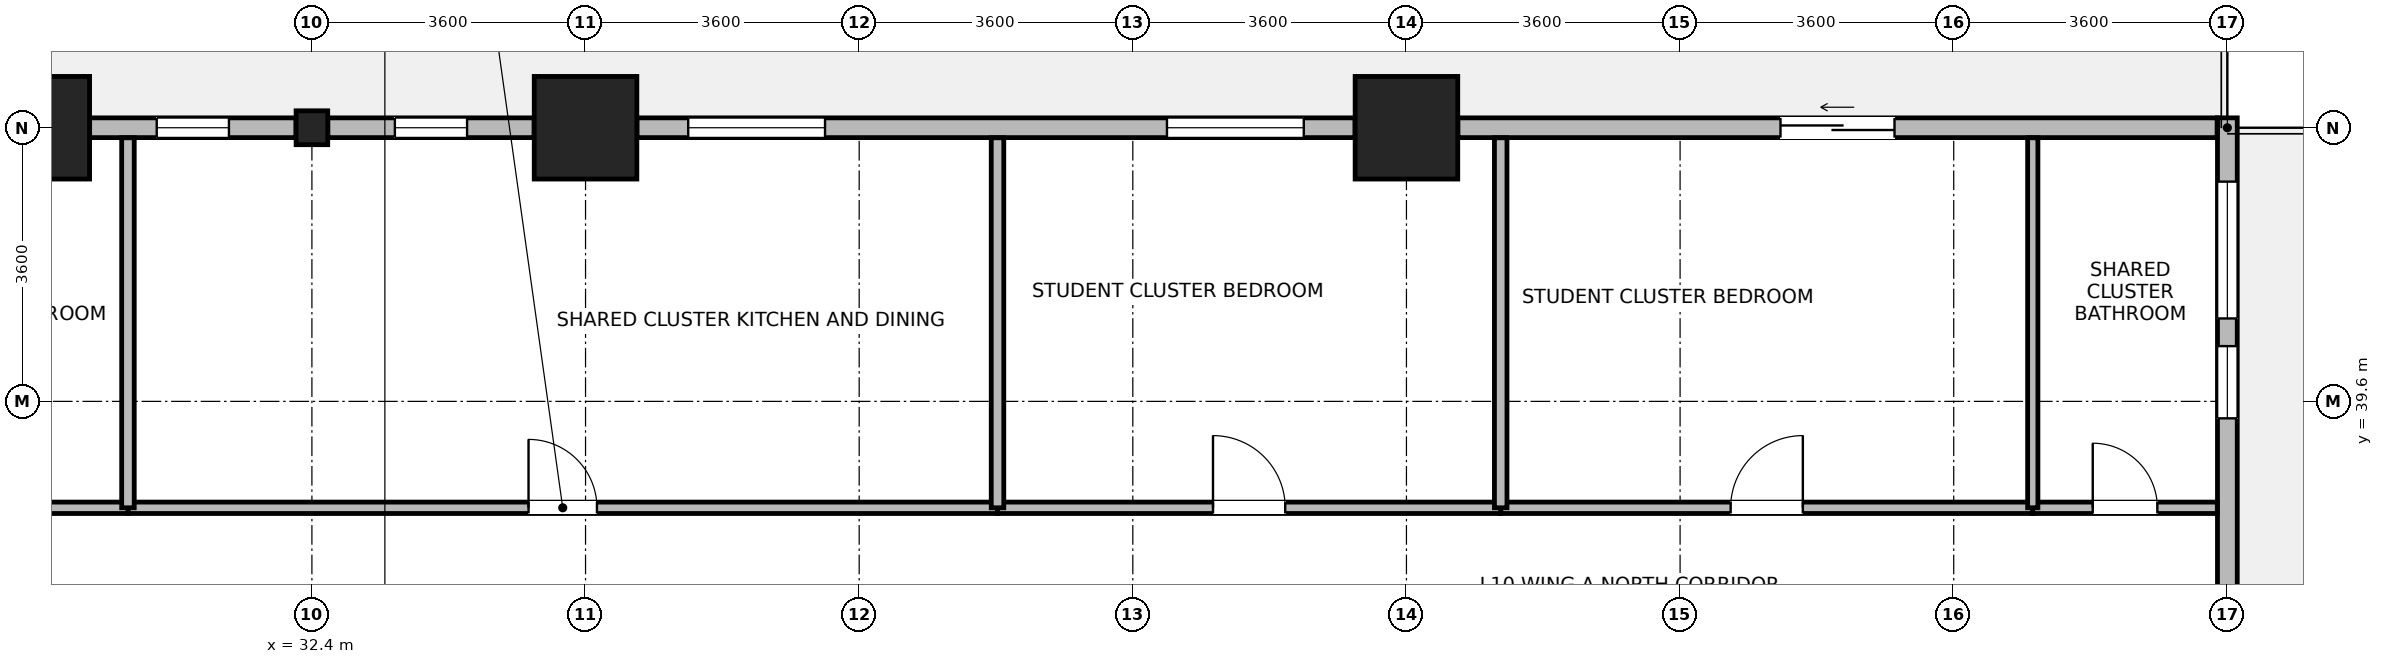
"""IFC4 building model, lengths in metres.
Left out: names, types, materials, properties, quantities, classifications, styles, units other than length and angle.
Written with IfcOpenShell. Run it as: python <this file> out.ifc"""

import sys

from ifc_helpers import new_model, si_unit, direction, frame, frame_2d, origin, origin_2d, place, context, subcontext, project, spatial, rectangle, i_section, extrude, source, transform, mapped, element, fill, save


model = new_model("IFC4")
c1 = context("Model", 3, precision=1e-05, world=origin(), true_north=direction((0.0, 1.0)))
c2 = subcontext(c1, "Body", "Model", "MODEL_VIEW")
j1 = project(units=[si_unit("LENGTHUNIT", "METRE"), si_unit("PLANEANGLEUNIT", "RADIAN")], contexts=[c1])
p1 = place(None, origin())
s1 = spatial("IfcSite", under=j1, at=p1, CompositionType="ELEMENT")
p2 = place(p1, origin())
s2 = spatial("IfcBuilding", under=s1, at=p2, CompositionType="ELEMENT")
p3 = place(p2, frame((0.0, 0.0, 43.8)))
s3 = spatial("IfcBuildingStorey", under=s2, at=p3, CompositionType="ELEMENT", Elevation=43.8)
m1 = source(origin(), c2, "Body", "SweptSolid", [
    extrude(rectangle(XDim=1.35, YDim=1.35, at=origin_2d()), origin(), (0.0, 0.0, 1.0), 3.7),
])
for number, where, z_axis, x_axis in (
    (1, (28.8, 43.2, 0.0), (0.0, 0.0, 1.0), (1.0, 0.0, 0.0)),
    (2, (36.0, 43.2, 0.0), (0.0, 0.0, 1.0), (1.0, 0.0, 0.0)),
    (3, (46.8, 43.2, 0.0), (0.0, 0.0, 1.0), (1.0, 0.0, 0.0)),
):
    element("IfcColumn", number, at=place(p3, frame(where, z_axis=z_axis, x_axis=x_axis)), inside=s3, PredefinedType="COLUMN", context=c2, shape_type="MappedRepresentation", body=[
        mapped(m1, transform((0.0, 0.0, 0.0), x_axis=(1.0, 0.0, 0.0), y_axis=(0.0, 1.0, 0.0), z_axis=(0.0, 0.0, 1.0), scale=1.0)),
    ])
m2 = source(origin(), c2, "Body", "SweptSolid", [
    extrude(i_section(OverallWidth=0.416, OverallDepth=0.446, WebThickness=0.029, FlangeThickness=0.04, FilletRadius=0.015, at=origin_2d()), origin(), (0.0, 0.0, 1.0), 3.7),
])
p4 = place(p3, frame((32.4, 43.2, 0.0), z_axis=(0.0, 0.0, 1.0), x_axis=(1.0, 0.0, 0.0)))
e4 = element("IfcColumn", 4, at=p4, inside=s3, PredefinedType="COLUMN", context=c2, shape_type="MappedRepresentation", body=[
    mapped(m2, transform((0.0, 0.0, 0.0), x_axis=(1.0, 0.0, 0.0), y_axis=(0.0, 1.0, 0.0), z_axis=(0.0, 0.0, 1.0), scale=1.0)),
])
p5 = place(p3, frame((57.6, 43.33, 0.0), z_axis=(0.0, 0.0, 1.0), x_axis=(0.0, -1.0, 0.0)))
e5 = element("IfcWall", 5, at=p5, inside=s3, PredefinedType="STANDARD", context=c2, shape_type="SweptSolid", body=[
    extrude(rectangle(XDim=6.956, YDim=0.26, at=frame_2d((3.478, 0.0))), origin(), (0.0, 0.0, 1.0), 3.43),
])
p6 = place(p5, frame((0.839, 0.0, 0.85)))
e6 = element("IfcOpeningElement", 6, at=p6, cuts=e5, PredefinedType="OPENING", context=c2, shape_type="SweptSolid", body=[
    extrude(rectangle(XDim=1.8, YDim=1.85, at=frame_2d((0.9, 0.925))), frame((0.0, 0.14, 0.0), z_axis=(0.0, -1.0, 0.0), x_axis=(1.0, 0.0, 0.0)), (0.0, 0.0, 1.0), 0.28),
])
p7 = place(p5, frame((3.003, 0.0, 0.85)))
e7 = element("IfcOpeningElement", 7, at=p7, cuts=e5, PredefinedType="OPENING", context=c2, shape_type="SweptSolid", body=[
    extrude(rectangle(XDim=0.95, YDim=1.75, at=frame_2d((0.475, 0.875))), frame((0.0, 0.14, 0.0), z_axis=(0.0, -1.0, 0.0), x_axis=(1.0, 0.0, 0.0)), (0.0, 0.0, 1.0), 0.28),
])
p8 = place(p3, frame((47.476, 43.2, 0.0), z_axis=(0.0, 0.0, 1.0), x_axis=(1.0, 0.0, 0.0)))
e8 = element("IfcWall", 8, at=p8, inside=s3, PredefinedType="STANDARD", context=c2, shape_type="SweptSolid", body=[
    extrude(rectangle(XDim=9.989, YDim=0.26, at=frame_2d((4.995, 0.0))), origin(), (0.0, 0.0, 1.0), 3.43),
])
p9 = place(p8, frame((4.245, 0.0, 0.0)))
e9 = element("IfcOpeningElement", 9, at=p9, cuts=e8, PredefinedType="OPENING", context=c2, shape_type="SweptSolid", body=[
    extrude(rectangle(XDim=1.5, YDim=2.15, at=frame_2d((0.75, 1.075))), frame((0.0, 0.14, 0.0), z_axis=(0.0, -1.0, 0.0), x_axis=(1.0, 0.0, 0.0)), (0.0, 0.0, 1.0), 0.28),
])
p10 = place(p3, frame((36.676, 43.2, 0.0), z_axis=(0.0, 0.0, 1.0), x_axis=(1.0, 0.0, 0.0)))
e10 = element("IfcWall", 10, at=p10, inside=s3, PredefinedType="STANDARD", context=c2, shape_type="SweptSolid", body=[
    extrude(rectangle(XDim=9.448, YDim=0.26, at=frame_2d((4.724, 0.0))), origin(), (0.0, 0.0, 1.0), 2.93),
])
p11 = place(p10, frame((0.675, 0.0, 0.85)))
e11 = element("IfcOpeningElement", 11, at=p11, cuts=e10, PredefinedType="OPENING", context=c2, shape_type="SweptSolid", body=[
    extrude(rectangle(XDim=1.8, YDim=1.85, at=frame_2d((0.9, 0.925))), frame((0.0, 0.14, 0.0), z_axis=(0.0, -1.0, 0.0), x_axis=(1.0, 0.0, 0.0)), (0.0, 0.0, 1.0), 0.28),
])
p12 = place(p10, frame((6.973, 0.0, 0.85)))
e12 = element("IfcOpeningElement", 12, at=p12, cuts=e10, PredefinedType="OPENING", context=c2, shape_type="SweptSolid", body=[
    extrude(rectangle(XDim=1.8, YDim=1.85, at=frame_2d((0.9, 0.925))), frame((0.0, 0.14, 0.0), z_axis=(0.0, -1.0, 0.0), x_axis=(1.0, 0.0, 0.0)), (0.0, 0.0, 1.0), 0.28),
])
p13 = place(p3, frame((32.609, 43.2, 0.0), z_axis=(0.0, 0.0, 1.0), x_axis=(1.0, 0.0, 0.0)))
e13 = element("IfcWall", 13, at=p13, inside=s3, PredefinedType="STANDARD", context=c2, shape_type="SweptSolid", body=[
    extrude(rectangle(XDim=2.715, YDim=0.26, at=frame_2d((1.357, 0.0))), origin(), (0.0, 0.0, 1.0), 2.93),
])
p14 = place(p13, frame((0.883, 0.0, 0.85)))
e14 = element("IfcOpeningElement", 14, at=p14, cuts=e13, PredefinedType="OPENING", context=c2, shape_type="SweptSolid", body=[
    extrude(rectangle(XDim=0.95, YDim=1.75, at=frame_2d((0.475, 0.875))), frame((0.0, 0.14, 0.0), z_axis=(0.0, -1.0, 0.0), x_axis=(1.0, 0.0, 0.0)), (0.0, 0.0, 1.0), 0.28),
])
p15 = place(p3, frame((29.476, 43.2, 0.0), z_axis=(0.0, 0.0, 1.0), x_axis=(1.0, 0.0, 0.0)))
e15 = element("IfcWall", 15, at=p15, inside=s3, PredefinedType="STANDARD", context=c2, shape_type="SweptSolid", body=[
    extrude(rectangle(XDim=2.715, YDim=0.26, at=frame_2d((1.357, 0.0))), origin(), (0.0, 0.0, 1.0), 2.93),
])
p16 = place(p15, frame((0.883, 0.0, 0.85)))
e16 = element("IfcOpeningElement", 16, at=p16, cuts=e15, PredefinedType="OPENING", context=c2, shape_type="SweptSolid", body=[
    extrude(rectangle(XDim=0.95, YDim=1.75, at=frame_2d((0.475, 0.875))), frame((0.0, 0.14, 0.0), z_axis=(0.0, -1.0, 0.0), x_axis=(1.0, 0.0, 0.0)), (0.0, 0.0, 1.0), 0.28),
])
p17 = place(p3, frame((29.98, 38.2, 0.0), z_axis=(0.0, 0.0, 1.0), x_axis=(1.0, 0.0, 0.0)))
e17 = element("IfcWall", 17, at=p17, inside=s3, PredefinedType="PARTITIONING", context=c2, shape_type="SweptSolid", body=[
    extrude(rectangle(XDim=11.44, YDim=0.15, at=frame_2d((5.72, 0.0))), origin(), (0.0, 0.0, 1.0), 3.43),
])
p18 = place(p17, frame((5.27, 0.0, 0.0)))
e18 = element("IfcOpeningElement", 18, at=p18, cuts=e17, PredefinedType="OPENING", context=c2, shape_type="SweptSolid", body=[
    extrude(rectangle(XDim=0.9, YDim=2.08, at=frame_2d((0.45, 1.04))), frame((0.0, 0.085, 0.0), z_axis=(0.0, -1.0, 0.0), x_axis=(1.0, 0.0, 0.0)), (0.0, 0.0, 1.0), 0.17),
])
p19 = place(p3, frame((20.08, 38.2, 0.0), z_axis=(0.0, 0.0, 1.0), x_axis=(1.0, 0.0, 0.0)))
e19 = element("IfcWall", 19, at=p19, inside=s3, PredefinedType="PARTITIONING", context=c2, shape_type="SweptSolid", body=[
    extrude(rectangle(XDim=9.9, YDim=0.15, at=frame_2d((4.95, 0.0))), origin(), (0.0, 0.0, 1.0), 3.43),
])
p20 = place(p19, frame((4.3, 0.0, 0.0)))
e20 = element("IfcOpeningElement", 20, at=p20, cuts=e19, PredefinedType="OPENING", context=c2, shape_type="SweptSolid", body=[
    extrude(rectangle(XDim=1.3, YDim=2.12, at=frame_2d((0.65, 1.06))), frame((0.0, 0.085, 0.0), z_axis=(0.0, -1.0, 0.0), x_axis=(1.0, 0.0, 0.0)), (0.0, 0.0, 1.0), 0.17),
])
p21 = place(p3, frame((48.04, 38.2, 0.0), z_axis=(0.0, 0.0, 1.0), x_axis=(1.0, 0.0, 0.0)))
e21 = element("IfcWall", 21, at=p21, inside=s3, PredefinedType="PARTITIONING", context=c2, shape_type="SweptSolid", body=[
    extrude(rectangle(XDim=7.0, YDim=0.15, at=frame_2d((3.5, 0.0))), origin(), (0.0, 0.0, 1.0), 3.43),
])
p22 = place(p21, frame((3.025, 0.0, 0.0)))
e22 = element("IfcOpeningElement", 22, at=p22, cuts=e21, PredefinedType="OPENING", context=c2, shape_type="SweptSolid", body=[
    extrude(rectangle(XDim=0.95, YDim=2.1, at=frame_2d((0.475, 1.05))), frame((0.0, 0.085, 0.0), z_axis=(0.0, -1.0, 0.0), x_axis=(1.0, 0.0, 0.0)), (0.0, 0.0, 1.0), 0.17),
])
p23 = place(p3, frame((41.42, 38.2, 0.0), z_axis=(0.0, 0.0, 1.0), x_axis=(1.0, 0.0, 0.0)))
e23 = element("IfcWall", 23, at=p23, inside=s3, PredefinedType="PARTITIONING", context=c2, shape_type="SweptSolid", body=[
    extrude(rectangle(XDim=6.62, YDim=0.15, at=frame_2d((3.31, 0.0))), origin(), (0.0, 0.0, 1.0), 3.43),
])
p24 = place(p23, frame((2.835, 0.0, 0.0)))
e24 = element("IfcOpeningElement", 24, at=p24, cuts=e23, PredefinedType="OPENING", context=c2, shape_type="SweptSolid", body=[
    extrude(rectangle(XDim=0.95, YDim=2.1, at=frame_2d((0.475, 1.05))), frame((0.0, 0.085, 0.0), z_axis=(0.0, -1.0, 0.0), x_axis=(1.0, 0.0, 0.0)), (0.0, 0.0, 1.0), 0.17),
])
p25 = place(p3, frame((55.04, 38.2, 0.0), z_axis=(0.0, 0.0, 1.0), x_axis=(1.0, 0.0, 0.0)))
e25 = element("IfcWall", 25, at=p25, inside=s3, PredefinedType="PARTITIONING", context=c2, shape_type="SweptSolid", body=[
    extrude(rectangle(XDim=2.428, YDim=0.15, at=frame_2d((1.214, 0.0))), origin(), (0.0, 0.0, 1.0), 3.43),
])
p26 = place(p25, frame((0.789, 0.0, 0.0)))
e26 = element("IfcOpeningElement", 26, at=p26, cuts=e25, PredefinedType="OPENING", context=c2, shape_type="SweptSolid", body=[
    extrude(rectangle(XDim=0.85, YDim=2.04, at=frame_2d((0.425, 1.02))), frame((0.0, 0.085, 0.0), z_axis=(0.0, -1.0, 0.0), x_axis=(1.0, 0.0, 0.0)), (0.0, 0.0, 1.0), 0.17),
])
for number, where, z_axis, x_axis in (
    (27, (29.98, 38.2, 0.0), (0.0, 0.0, 1.0), (0.0, 1.0, 0.0)),
    (28, (41.42, 38.2, 0.0), (0.0, 0.0, 1.0), (0.0, 1.0, 0.0)),
    (29, (48.04, 38.2, 0.0), (0.0, 0.0, 1.0), (0.0, 1.0, 0.0)),
):
    element("IfcWall", number, at=place(p3, frame(where, z_axis=z_axis, x_axis=x_axis)), inside=s3, PredefinedType="PARTITIONING", context=c2, shape_type="SweptSolid", body=[
        extrude(rectangle(XDim=4.868, YDim=0.165, at=frame_2d((2.434, 0.0))), origin(), (0.0, 0.0, 1.0), 3.43),
    ])
p27 = place(p3, frame((55.04, 38.2, 0.0), z_axis=(0.0, 0.0, 1.0), x_axis=(0.0, 1.0, 0.0)))
e30 = element("IfcWall", 30, at=p27, inside=s3, PredefinedType="PARTITIONING", context=c2, shape_type="SweptSolid", body=[
    extrude(rectangle(XDim=4.868, YDim=0.135, at=frame_2d((2.434, 0.0))), origin(), (0.0, 0.0, 1.0), 3.43),
])
p28 = place(p6, origin())
e31 = element("IfcWindow", 31, at=p28, inside=s3, PartitioningType="SINGLE_PANEL", PredefinedType="WINDOW", context=c2, shape_type="SweptSolid", body=[
    extrude(rectangle(XDim=1.8, YDim=1.85, at=frame_2d((0.9, 0.925))), frame((0.0, 0.03, 0.0), z_axis=(0.0, -1.0, 0.0), x_axis=(1.0, 0.0, 0.0)), (0.0, 0.0, 1.0), 0.06),
])
fill(e6, e31)
p29 = place(p7, origin())
e32 = element("IfcWindow", 32, at=p29, inside=s3, PartitioningType="SINGLE_PANEL", PredefinedType="WINDOW", context=c2, shape_type="SweptSolid", body=[
    extrude(rectangle(XDim=0.95, YDim=1.75, at=frame_2d((0.475, 0.875))), frame((0.0, 0.03, 0.0), z_axis=(0.0, -1.0, 0.0), x_axis=(1.0, 0.0, 0.0)), (0.0, 0.0, 1.0), 0.06),
])
fill(e7, e32)
p30 = place(p9, origin())
e33 = element("IfcDoor", 33, at=p30, inside=s3, OperationType="SLIDING_TO_LEFT", PredefinedType="DOOR", context=c2, shape_type="SweptSolid", body=[
    extrude(rectangle(XDim=1.5, YDim=2.15, at=frame_2d((0.75, 1.075))), frame((0.0, 0.025, 0.0), z_axis=(0.0, -1.0, 0.0), x_axis=(1.0, 0.0, 0.0)), (0.0, 0.0, 1.0), 0.05),
])
fill(e9, e33)
p31 = place(p11, origin())
e34 = element("IfcWindow", 34, at=p31, inside=s3, PartitioningType="SINGLE_PANEL", PredefinedType="WINDOW", context=c2, shape_type="SweptSolid", body=[
    extrude(rectangle(XDim=1.8, YDim=1.85, at=frame_2d((0.9, 0.925))), frame((0.0, 0.03, 0.0), z_axis=(0.0, -1.0, 0.0), x_axis=(1.0, 0.0, 0.0)), (0.0, 0.0, 1.0), 0.06),
])
fill(e11, e34)
p32 = place(p12, origin())
e35 = element("IfcWindow", 35, at=p32, inside=s3, PartitioningType="SINGLE_PANEL", PredefinedType="WINDOW", context=c2, shape_type="SweptSolid", body=[
    extrude(rectangle(XDim=1.8, YDim=1.85, at=frame_2d((0.9, 0.925))), frame((0.0, 0.03, 0.0), z_axis=(0.0, -1.0, 0.0), x_axis=(1.0, 0.0, 0.0)), (0.0, 0.0, 1.0), 0.06),
])
fill(e12, e35)
p33 = place(p14, origin())
e36 = element("IfcWindow", 36, at=p33, inside=s3, PartitioningType="SINGLE_PANEL", PredefinedType="WINDOW", context=c2, shape_type="SweptSolid", body=[
    extrude(rectangle(XDim=0.95, YDim=1.75, at=frame_2d((0.475, 0.875))), frame((0.0, 0.03, 0.0), z_axis=(0.0, -1.0, 0.0), x_axis=(1.0, 0.0, 0.0)), (0.0, 0.0, 1.0), 0.06),
])
fill(e14, e36)
p34 = place(p16, origin())
e37 = element("IfcWindow", 37, at=p34, inside=s3, PartitioningType="SINGLE_PANEL", PredefinedType="WINDOW", context=c2, shape_type="SweptSolid", body=[
    extrude(rectangle(XDim=0.95, YDim=1.75, at=frame_2d((0.475, 0.875))), frame((0.0, 0.03, 0.0), z_axis=(0.0, -1.0, 0.0), x_axis=(1.0, 0.0, 0.0)), (0.0, 0.0, 1.0), 0.06),
])
fill(e16, e37)
p35 = place(p18, origin())
e38 = element("IfcDoor", 38, at=p35, inside=s3, OperationType="SINGLE_SWING_LEFT", PredefinedType="DOOR", context=c2, shape_type="SweptSolid", body=[
    extrude(rectangle(XDim=0.9, YDim=2.08, at=frame_2d((0.45, 1.04))), frame((0.0, 0.025, 0.0), z_axis=(0.0, -1.0, 0.0), x_axis=(1.0, 0.0, 0.0)), (0.0, 0.0, 1.0), 0.05),
])
fill(e18, e38)
p36 = place(p22, origin())
e39 = element("IfcDoor", 39, at=p36, inside=s3, OperationType="SINGLE_SWING_RIGHT", PredefinedType="DOOR", context=c2, shape_type="SweptSolid", body=[
    extrude(rectangle(XDim=0.95, YDim=2.1, at=frame_2d((0.475, 1.05))), frame((0.0, 0.025, 0.0), z_axis=(0.0, -1.0, 0.0), x_axis=(1.0, 0.0, 0.0)), (0.0, 0.0, 1.0), 0.05),
])
fill(e22, e39)
p37 = place(p24, origin())
e40 = element("IfcDoor", 40, at=p37, inside=s3, OperationType="SINGLE_SWING_LEFT", PredefinedType="DOOR", context=c2, shape_type="SweptSolid", body=[
    extrude(rectangle(XDim=0.95, YDim=2.1, at=frame_2d((0.475, 1.05))), frame((0.0, 0.025, 0.0), z_axis=(0.0, -1.0, 0.0), x_axis=(1.0, 0.0, 0.0)), (0.0, 0.0, 1.0), 0.05),
])
fill(e24, e40)
p38 = place(p26, origin())
e41 = element("IfcDoor", 41, at=p38, inside=s3, OperationType="SINGLE_SWING_LEFT", PredefinedType="DOOR", context=c2, shape_type="SweptSolid", body=[
    extrude(rectangle(XDim=0.85, YDim=2.04, at=frame_2d((0.425, 1.02))), frame((0.0, 0.025, 0.0), z_axis=(0.0, -1.0, 0.0), x_axis=(1.0, 0.0, 0.0)), (0.0, 0.0, 1.0), 0.05),
])
fill(e26, e41)
save(model, sys.argv[1])
